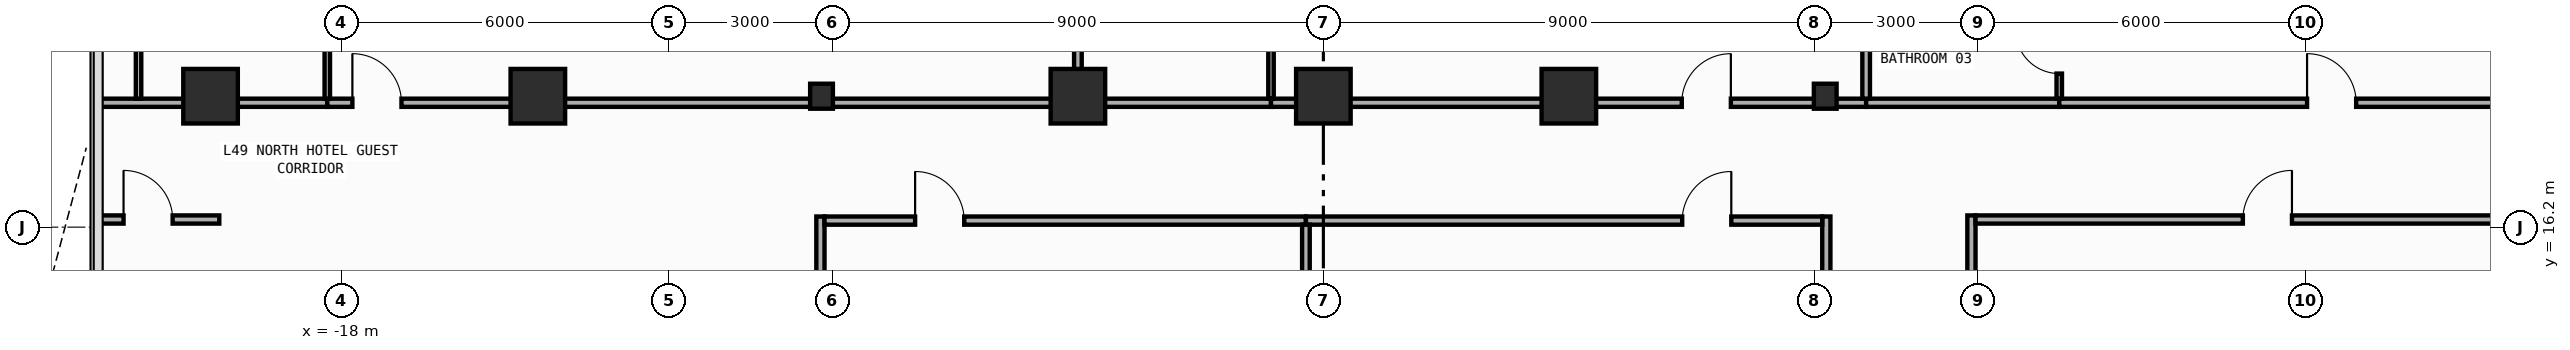
"""IFC4 building model, lengths in metres.
Left out: names, types, materials, properties, quantities, classifications, styles, units other than length and angle.
Written with IfcOpenShell. Run it as: python <this file> out.ifc"""

import sys

from ifc_helpers import new_model, si_unit, direction, frame, frame_2d, origin, origin_2d, place, context, subcontext, project, spatial, rectangle, i_section, extrude, element, fill, save


model = new_model("IFC4")
c1 = context("Model", 3, precision=1e-05, world=origin(), true_north=direction((0.0, 1.0)))
c2 = subcontext(c1, "Body", "Model", "MODEL_VIEW")
j1 = project(units=[si_unit("LENGTHUNIT", "METRE"), si_unit("PLANEANGLEUNIT", "RADIAN")], contexts=[c1])
p1 = place(None, origin())
s1 = spatial("IfcSite", under=j1, at=p1, CompositionType="ELEMENT")
p2 = place(p1, origin())
s2 = spatial("IfcBuilding", under=s1, at=p2, CompositionType="ELEMENT")
p3 = place(p2, frame((0.0, 0.0, 210.6)))
s3 = spatial("IfcBuildingStorey", under=s2, at=p3, CompositionType="ELEMENT", Elevation=210.6)
for number, where, z_axis, x_axis in (
    (1, (-9.2, 18.6, 0.0), (0.0, 0.0, 1.0), (1.0, 0.0, 0.0)),
    (2, (9.2, 18.6, 0.0), (0.0, 0.0, 1.0), (1.0, 0.0, 0.0)),
):
    element("IfcColumn", number, at=place(p3, frame(where, z_axis=z_axis, x_axis=x_axis)), inside=s3, PredefinedType="COLUMN", context=c2, shape_type="SweptSolid", body=[
        extrude(i_section(OverallWidth=0.417, OverallDepth=0.458, WebThickness=0.03, FlangeThickness=0.05, FilletRadius=0.022, at=origin_2d()), origin(), (0.0, 0.0, 1.0), 3.8),
    ])
for number, where, z_axis, x_axis in (
    (3, (-20.4, 18.6, 0.0), (0.0, 0.0, 1.0), (1.0, 0.0, 0.0)),
    (4, (-14.4, 18.6, 0.0), (0.0, 0.0, 1.0), (1.0, 0.0, 0.0)),
    (5, (-4.5, 18.6, 0.0), (0.0, 0.0, 1.0), (1.0, 0.0, 0.0)),
    (6, (0.0, 18.6, 0.0), (0.0, 0.0, 1.0), (1.0, 0.0, 0.0)),
    (7, (4.5, 18.6, 0.0), (0.0, 0.0, 1.0), (1.0, 0.0, 0.0)),
):
    element("IfcColumn", number, at=place(p3, frame(where, z_axis=z_axis, x_axis=x_axis)), inside=s3, PredefinedType="COLUMN", context=c2, shape_type="SweptSolid", body=[
        extrude(rectangle(XDim=1.0, YDim=1.0, at=origin_2d()), origin(), (0.0, 0.0, 1.0), 3.8),
    ])
p4 = place(p3, frame((-9.22, 4.2, 0.0), z_axis=(0.0, 0.0, 1.0), x_axis=(0.0, 1.0, 0.0)))
e8 = element("IfcWall", 8, at=p4, inside=s3, PredefinedType="PARTITIONING", context=c2, shape_type="SweptSolid", body=[
    extrude(rectangle(XDim=12.195, YDim=0.15, at=frame_2d((6.098, 0.0))), origin(), (0.0, 0.0, 1.0), 2.862),
])
p5 = place(p4, frame((0.663, 0.0, 0.0)))
e9 = element("IfcOpeningElement", 9, at=p5, cuts=e8, PredefinedType="OPENING", context=c2, shape_type="SweptSolid", body=[
    extrude(rectangle(XDim=0.9, YDim=2.15, at=frame_2d((0.45, 1.075))), frame((0.0, 0.085, 0.0), z_axis=(0.0, -1.0, 0.0), x_axis=(1.0, 0.0, 0.0)), (0.0, 0.0, 1.0), 0.17),
])
p6 = place(p3, frame((9.22, 4.2, 0.0), z_axis=(0.0, 0.0, 1.0), x_axis=(0.0, 1.0, 0.0)))
e10 = element("IfcWall", 10, at=p6, inside=s3, PredefinedType="PARTITIONING", context=c2, shape_type="SweptSolid", body=[
    extrude(rectangle(XDim=12.195, YDim=0.15, at=frame_2d((6.098, 0.0))), origin(), (0.0, 0.0, 1.0), 2.862),
])
p7 = place(p6, frame((0.663, 0.0, 0.0)))
e11 = element("IfcOpeningElement", 11, at=p7, cuts=e10, PredefinedType="OPENING", context=c2, shape_type="SweptSolid", body=[
    extrude(rectangle(XDim=0.9, YDim=2.15, at=frame_2d((0.45, 1.075))), frame((0.0, 0.085, 0.0), z_axis=(0.0, -1.0, 0.0), x_axis=(1.0, 0.0, 0.0)), (0.0, 0.0, 1.0), 0.17),
])
p8 = place(p3, frame((11.88, 7.16, 0.0), z_axis=(0.0, 0.0, 1.0), x_axis=(0.0, 1.0, 0.0)))
e12 = element("IfcWall", 12, at=p8, inside=s3, PredefinedType="PARTITIONING", context=c2, shape_type="SweptSolid", body=[
    extrude(rectangle(XDim=9.255, YDim=0.15, at=frame_2d((4.627, 0.0))), origin(), (0.0, 0.0, 1.0), 3.45),
])
p9 = place(p8, frame((0.46, 0.0, 0.0)))
e13 = element("IfcOpeningElement", 13, at=p9, cuts=e12, PredefinedType="OPENING", context=c2, shape_type="SweptSolid", body=[
    extrude(rectangle(XDim=0.9, YDim=2.15, at=frame_2d((0.45, 1.075))), frame((0.0, 0.085, 0.0), z_axis=(0.0, -1.0, 0.0), x_axis=(1.0, 0.0, 0.0)), (0.0, 0.0, 1.0), 0.17),
])
p10 = place(p3, frame((-9.145, 16.32, 0.0), z_axis=(0.0, 0.0, 1.0), x_axis=(1.0, 0.0, 0.0)))
e14 = element("IfcWall", 14, at=p10, inside=s3, PredefinedType="PARTITIONING", context=c2, shape_type="SweptSolid", body=[
    extrude(rectangle(XDim=8.825, YDim=0.15, at=frame_2d((4.413, 0.0))), origin(), (0.0, 0.0, 1.0), 3.45),
])
p11 = place(p10, frame((1.661, 0.0, 0.0)))
e15 = element("IfcOpeningElement", 15, at=p11, cuts=e14, PredefinedType="OPENING", context=c2, shape_type="SweptSolid", body=[
    extrude(rectangle(XDim=0.9, YDim=2.15, at=frame_2d((0.45, 1.075))), frame((0.0, 0.085, 0.0), z_axis=(0.0, -1.0, 0.0), x_axis=(1.0, 0.0, 0.0)), (0.0, 0.0, 1.0), 0.17),
])
p12 = place(p3, frame((-0.32, 16.32, 0.0), z_axis=(0.0, 0.0, 1.0), x_axis=(1.0, 0.0, 0.0)))
e16 = element("IfcWall", 16, at=p12, inside=s3, PredefinedType="PARTITIONING", context=c2, shape_type="SweptSolid", body=[
    extrude(rectangle(XDim=9.465, YDim=0.15, at=frame_2d((4.732, 0.0))), origin(), (0.0, 0.0, 1.0), 3.45),
])
p13 = place(p12, frame((6.898, 0.0, 0.0)))
e17 = element("IfcOpeningElement", 17, at=p13, cuts=e16, PredefinedType="OPENING", context=c2, shape_type="SweptSolid", body=[
    extrude(rectangle(XDim=0.9, YDim=2.15, at=frame_2d((0.45, 1.075))), frame((0.0, 0.085, 0.0), z_axis=(0.0, -1.0, 0.0), x_axis=(1.0, 0.0, 0.0)), (0.0, 0.0, 1.0), 0.17),
])
p14 = place(p3, frame((-22.455, 18.48, 0.0), z_axis=(0.0, 0.0, 1.0), x_axis=(1.0, 0.0, 0.0)))
e18 = element("IfcWall", 18, at=p14, inside=s3, PredefinedType="PARTITIONING", context=c2, shape_type="SweptSolid", body=[
    extrude(rectangle(XDim=4.195, YDim=0.15, at=frame_2d((2.098, 0.0))), origin(), (0.0, 0.0, 1.0), 2.862),
])
p15 = place(p3, frame((-18.26, 18.48, 0.0), z_axis=(0.0, 0.0, 1.0), x_axis=(1.0, 0.0, 0.0)))
e19 = element("IfcWall", 19, at=p15, inside=s3, PredefinedType="PARTITIONING", context=c2, shape_type="SweptSolid", body=[
    extrude(rectangle(XDim=13.76, YDim=0.15, at=frame_2d((6.88, 0.0))), origin(), (0.0, 0.0, 1.0), 2.862),
])
p16 = place(p15, frame((0.46, 0.0, 0.0)))
e20 = element("IfcOpeningElement", 20, at=p16, cuts=e19, PredefinedType="OPENING", context=c2, shape_type="SweptSolid", body=[
    extrude(rectangle(XDim=0.9, YDim=2.15, at=frame_2d((0.45, 1.075))), frame((0.0, 0.085, 0.0), z_axis=(0.0, -1.0, 0.0), x_axis=(1.0, 0.0, 0.0)), (0.0, 0.0, 1.0), 0.17),
])
p17 = place(p3, frame((-4.5, 18.48, 0.0), z_axis=(0.0, 0.0, 1.0), x_axis=(1.0, 0.0, 0.0)))
e21 = element("IfcWall", 21, at=p17, inside=s3, PredefinedType="PARTITIONING", context=c2, shape_type="SweptSolid", body=[
    extrude(rectangle(XDim=3.54, YDim=0.15, at=frame_2d((1.77, 0.0))), origin(), (0.0, 0.0, 1.0), 2.862),
])
p18 = place(p3, frame((-0.96, 18.48, 0.0), z_axis=(0.0, 0.0, 1.0), x_axis=(1.0, 0.0, 0.0)))
e22 = element("IfcWall", 22, at=p18, inside=s3, PredefinedType="PARTITIONING", context=c2, shape_type="SweptSolid", body=[
    extrude(rectangle(XDim=10.91, YDim=0.15, at=frame_2d((5.455, 0.0))), origin(), (0.0, 0.0, 1.0), 2.862),
])
p19 = place(p18, frame((7.53, 0.0, 0.0)))
e23 = element("IfcOpeningElement", 23, at=p19, cuts=e22, PredefinedType="OPENING", context=c2, shape_type="SweptSolid", body=[
    extrude(rectangle(XDim=0.9, YDim=2.15, at=frame_2d((0.45, 1.075))), frame((0.0, 0.085, 0.0), z_axis=(0.0, -1.0, 0.0), x_axis=(1.0, 0.0, 0.0)), (0.0, 0.0, 1.0), 0.17),
])
p20 = place(p3, frame((9.95, 18.48, 0.0), z_axis=(0.0, 0.0, 1.0), x_axis=(1.0, 0.0, 0.0)))
e24 = element("IfcWall", 24, at=p20, inside=s3, PredefinedType="PARTITIONING", context=c2, shape_type="SweptSolid", body=[
    extrude(rectangle(XDim=3.54, YDim=0.15, at=frame_2d((1.77, 0.0))), origin(), (0.0, 0.0, 1.0), 3.45),
])
p21 = place(p3, frame((13.49, 18.48, 0.0), z_axis=(0.0, 0.0, 1.0), x_axis=(1.0, 0.0, 0.0)))
e25 = element("IfcWall", 25, at=p21, inside=s3, PredefinedType="PARTITIONING", context=c2, shape_type="SweptSolid", body=[
    extrude(rectangle(XDim=8.965, YDim=0.15, at=frame_2d((4.482, 0.0))), origin(), (0.0, 0.0, 1.0), 3.45),
])
p22 = place(p21, frame((4.543, 0.0, 0.0)))
e26 = element("IfcOpeningElement", 26, at=p22, cuts=e25, PredefinedType="OPENING", context=c2, shape_type="SweptSolid", body=[
    extrude(rectangle(XDim=0.9, YDim=2.15, at=frame_2d((0.45, 1.075))), frame((0.0, 0.085, 0.0), z_axis=(0.0, -1.0, 0.0), x_axis=(1.0, 0.0, 0.0)), (0.0, 0.0, 1.0), 0.17),
])
p23 = place(p3, frame((11.955, 16.34, 0.0), z_axis=(0.0, 0.0, 1.0), x_axis=(1.0, 0.0, 0.0)))
e27 = element("IfcWall", 27, at=p23, inside=s3, PredefinedType="PARTITIONING", context=c2, shape_type="SweptSolid", body=[
    extrude(rectangle(XDim=10.5, YDim=0.15, at=frame_2d((5.25, 0.0))), origin(), (0.0, 0.0, 1.0), 3.45),
])
p24 = place(p23, frame((4.901, 0.0, 0.0)))
e28 = element("IfcOpeningElement", 28, at=p24, cuts=e27, PredefinedType="OPENING", context=c2, shape_type="SweptSolid", body=[
    extrude(rectangle(XDim=0.9, YDim=2.15, at=frame_2d((0.45, 1.075))), frame((0.0, 0.085, 0.0), z_axis=(0.0, -1.0, 0.0), x_axis=(1.0, 0.0, 0.0)), (0.0, 0.0, 1.0), 0.17),
])
p25 = place(p3, frame((-22.455, 16.34, 0.0), z_axis=(0.0, 0.0, 1.0), x_axis=(1.0, 0.0, 0.0)))
e29 = element("IfcWall", 29, at=p25, inside=s3, PredefinedType="PARTITIONING", context=c2, shape_type="SweptSolid", body=[
    extrude(rectangle(XDim=2.215, YDim=0.15, at=frame_2d((1.107, 0.0))), origin(), (0.0, 0.0, 1.0), 3.45),
])
p26 = place(p25, frame((0.46, 0.0, 0.0)))
e30 = element("IfcOpeningElement", 30, at=p26, cuts=e29, PredefinedType="OPENING", context=c2, shape_type="SweptSolid", body=[
    extrude(rectangle(XDim=0.9, YDim=2.15, at=frame_2d((0.45, 1.075))), frame((0.0, 0.085, 0.0), z_axis=(0.0, -1.0, 0.0), x_axis=(1.0, 0.0, 0.0)), (0.0, 0.0, 1.0), 0.17),
])
p27 = place(p3, frame((-0.32, 4.27, 0.0), z_axis=(0.0, 0.0, 1.0), x_axis=(0.0, 1.0, 0.0)))
e31 = element("IfcWall", 31, at=p27, inside=s3, PredefinedType="PARTITIONING", context=c2, shape_type="SweptSolid", body=[
    extrude(rectangle(XDim=11.975, YDim=0.14, at=frame_2d((5.988, 0.0))), origin(), (0.0, 0.0, 1.0), 3.45),
])
p28 = place(p3, frame((-18.26, 18.555, 0.0), z_axis=(0.0, 0.0, 1.0), x_axis=(0.0, 1.0, 0.0)))
e32 = element("IfcWall", 32, at=p28, inside=s3, PredefinedType="PARTITIONING", context=c2, shape_type="SweptSolid", body=[
    extrude(rectangle(XDim=2.965, YDim=0.1, at=frame_2d((1.482, 0.0))), origin(), (0.0, 0.0, 1.0), 3.45),
])
p29 = place(p28, frame((1.705, 0.0, 0.0)))
e33 = element("IfcOpeningElement", 33, at=p29, cuts=e32, PredefinedType="OPENING", context=c2, shape_type="SweptSolid", body=[
    extrude(rectangle(XDim=0.8, YDim=2.1, at=frame_2d((0.4, 1.05))), frame((0.0, 0.06, 0.0), z_axis=(0.0, -1.0, 0.0), x_axis=(1.0, 0.0, 0.0)), (0.0, 0.0, 1.0), 0.12),
])
p30 = place(p3, frame((-4.5, 18.555, 0.0), z_axis=(0.0, 0.0, 1.0), x_axis=(0.0, 1.0, 0.0)))
e34 = element("IfcWall", 34, at=p30, inside=s3, PredefinedType="PARTITIONING", context=c2, shape_type="SweptSolid", body=[
    extrude(rectangle(XDim=3.015, YDim=0.14, at=frame_2d((1.508, 0.0))), origin(), (0.0, 0.0, 1.0), 3.45),
])
p31 = place(p3, frame((-0.96, 18.555, 0.0), z_axis=(0.0, 0.0, 1.0), x_axis=(0.0, 1.0, 0.0)))
e35 = element("IfcWall", 35, at=p31, inside=s3, PredefinedType="PARTITIONING", context=c2, shape_type="SweptSolid", body=[
    extrude(rectangle(XDim=2.965, YDim=0.1, at=frame_2d((1.482, 0.0))), origin(), (0.0, 0.0, 1.0), 3.45),
])
p32 = place(p31, frame((1.705, 0.0, 0.0)))
e36 = element("IfcOpeningElement", 36, at=p32, cuts=e35, PredefinedType="OPENING", context=c2, shape_type="SweptSolid", body=[
    extrude(rectangle(XDim=0.8, YDim=2.1, at=frame_2d((0.4, 1.05))), frame((0.0, 0.06, 0.0), z_axis=(0.0, -1.0, 0.0), x_axis=(1.0, 0.0, 0.0)), (0.0, 0.0, 1.0), 0.12),
])
p33 = place(p3, frame((9.95, 18.555, 0.0), z_axis=(0.0, 0.0, 1.0), x_axis=(0.0, 1.0, 0.0)))
e37 = element("IfcWall", 37, at=p33, inside=s3, PredefinedType="PARTITIONING", context=c2, shape_type="SweptSolid", body=[
    extrude(rectangle(XDim=3.015, YDim=0.14, at=frame_2d((1.508, 0.0))), origin(), (0.0, 0.0, 1.0), 3.45),
])
p34 = place(p3, frame((13.49, 18.555, 0.0), z_axis=(0.0, 0.0, 1.0), x_axis=(0.0, 1.0, 0.0)))
e38 = element("IfcWall", 38, at=p34, inside=s3, PredefinedType="PARTITIONING", context=c2, shape_type="SweptSolid", body=[
    extrude(rectangle(XDim=2.965, YDim=0.1, at=frame_2d((1.482, 0.0))), origin(), (0.0, 0.0, 1.0), 3.45),
])
p35 = place(p34, frame((0.46, 0.0, 0.0)))
e39 = element("IfcOpeningElement", 39, at=p35, cuts=e38, PredefinedType="OPENING", context=c2, shape_type="SweptSolid", body=[
    extrude(rectangle(XDim=0.8, YDim=2.1, at=frame_2d((0.4, 1.05))), frame((0.0, 0.06, 0.0), z_axis=(0.0, -1.0, 0.0), x_axis=(1.0, 0.0, 0.0)), (0.0, 0.0, 1.0), 0.12),
])
p36 = place(p3, frame((-21.72, 18.555, 0.0), z_axis=(0.0, 0.0, 1.0), x_axis=(0.0, 1.0, 0.0)))
e40 = element("IfcWall", 40, at=p36, inside=s3, PredefinedType="PARTITIONING", context=c2, shape_type="SweptSolid", body=[
    extrude(rectangle(XDim=2.965, YDim=0.1, at=frame_2d((1.482, 0.0))), origin(), (0.0, 0.0, 1.0), 3.45),
])
p37 = place(p11, origin())
e41 = element("IfcDoor", 41, at=p37, inside=s3, OperationType="SINGLE_SWING_LEFT", PredefinedType="DOOR", context=c2, shape_type="SweptSolid", body=[
    extrude(rectangle(XDim=0.9, YDim=2.15, at=frame_2d((0.45, 1.075))), frame((0.0, 0.025, 0.0), z_axis=(0.0, -1.0, 0.0), x_axis=(1.0, 0.0, 0.0)), (0.0, 0.0, 1.0), 0.05),
])
fill(e15, e41)
p38 = place(p13, origin())
e42 = element("IfcDoor", 42, at=p38, inside=s3, OperationType="SINGLE_SWING_RIGHT", PredefinedType="DOOR", context=c2, shape_type="SweptSolid", body=[
    extrude(rectangle(XDim=0.9, YDim=2.15, at=frame_2d((0.45, 1.075))), frame((0.0, 0.025, 0.0), z_axis=(0.0, -1.0, 0.0), x_axis=(1.0, 0.0, 0.0)), (0.0, 0.0, 1.0), 0.05),
])
fill(e17, e42)
p39 = place(p16, origin())
e43 = element("IfcDoor", 43, at=p39, inside=s3, OperationType="SINGLE_SWING_LEFT", PredefinedType="DOOR", context=c2, shape_type="SweptSolid", body=[
    extrude(rectangle(XDim=0.9, YDim=2.15, at=frame_2d((0.45, 1.075))), frame((0.0, 0.025, 0.0), z_axis=(0.0, -1.0, 0.0), x_axis=(1.0, 0.0, 0.0)), (0.0, 0.0, 1.0), 0.05),
])
fill(e20, e43)
p40 = place(p19, origin())
e44 = element("IfcDoor", 44, at=p40, inside=s3, OperationType="SINGLE_SWING_RIGHT", PredefinedType="DOOR", context=c2, shape_type="SweptSolid", body=[
    extrude(rectangle(XDim=0.9, YDim=2.15, at=frame_2d((0.45, 1.075))), frame((0.0, 0.025, 0.0), z_axis=(0.0, -1.0, 0.0), x_axis=(1.0, 0.0, 0.0)), (0.0, 0.0, 1.0), 0.05),
])
fill(e23, e44)
p41 = place(p22, origin())
e45 = element("IfcDoor", 45, at=p41, inside=s3, OperationType="SINGLE_SWING_LEFT", PredefinedType="DOOR", context=c2, shape_type="SweptSolid", body=[
    extrude(rectangle(XDim=0.9, YDim=2.15, at=frame_2d((0.45, 1.075))), frame((0.0, 0.025, 0.0), z_axis=(0.0, -1.0, 0.0), x_axis=(1.0, 0.0, 0.0)), (0.0, 0.0, 1.0), 0.05),
])
fill(e26, e45)
p42 = place(p24, origin())
e46 = element("IfcDoor", 46, at=p42, inside=s3, OperationType="SINGLE_SWING_RIGHT", PredefinedType="DOOR", context=c2, shape_type="SweptSolid", body=[
    extrude(rectangle(XDim=0.9, YDim=2.15, at=frame_2d((0.45, 1.075))), frame((0.0, 0.025, 0.0), z_axis=(0.0, -1.0, 0.0), x_axis=(1.0, 0.0, 0.0)), (0.0, 0.0, 1.0), 0.05),
])
fill(e28, e46)
p43 = place(p26, origin())
e47 = element("IfcDoor", 47, at=p43, inside=s3, OperationType="SINGLE_SWING_LEFT", PredefinedType="DOOR", context=c2, shape_type="SweptSolid", body=[
    extrude(rectangle(XDim=0.9, YDim=2.15, at=frame_2d((0.45, 1.075))), frame((0.0, 0.025, 0.0), z_axis=(0.0, -1.0, 0.0), x_axis=(1.0, 0.0, 0.0)), (0.0, 0.0, 1.0), 0.05),
])
fill(e30, e47)
p44 = place(p35, origin())
e48 = element("IfcDoor", 48, at=p44, inside=s3, OperationType="SINGLE_SWING_RIGHT", PredefinedType="DOOR", context=c2, shape_type="SweptSolid", body=[
    extrude(rectangle(XDim=0.8, YDim=2.1, at=frame_2d((0.4, 1.05))), frame((0.0, 0.025, 0.0), z_axis=(0.0, -1.0, 0.0), x_axis=(1.0, 0.0, 0.0)), (0.0, 0.0, 1.0), 0.05),
])
fill(e39, e48)
save(model, sys.argv[1])
